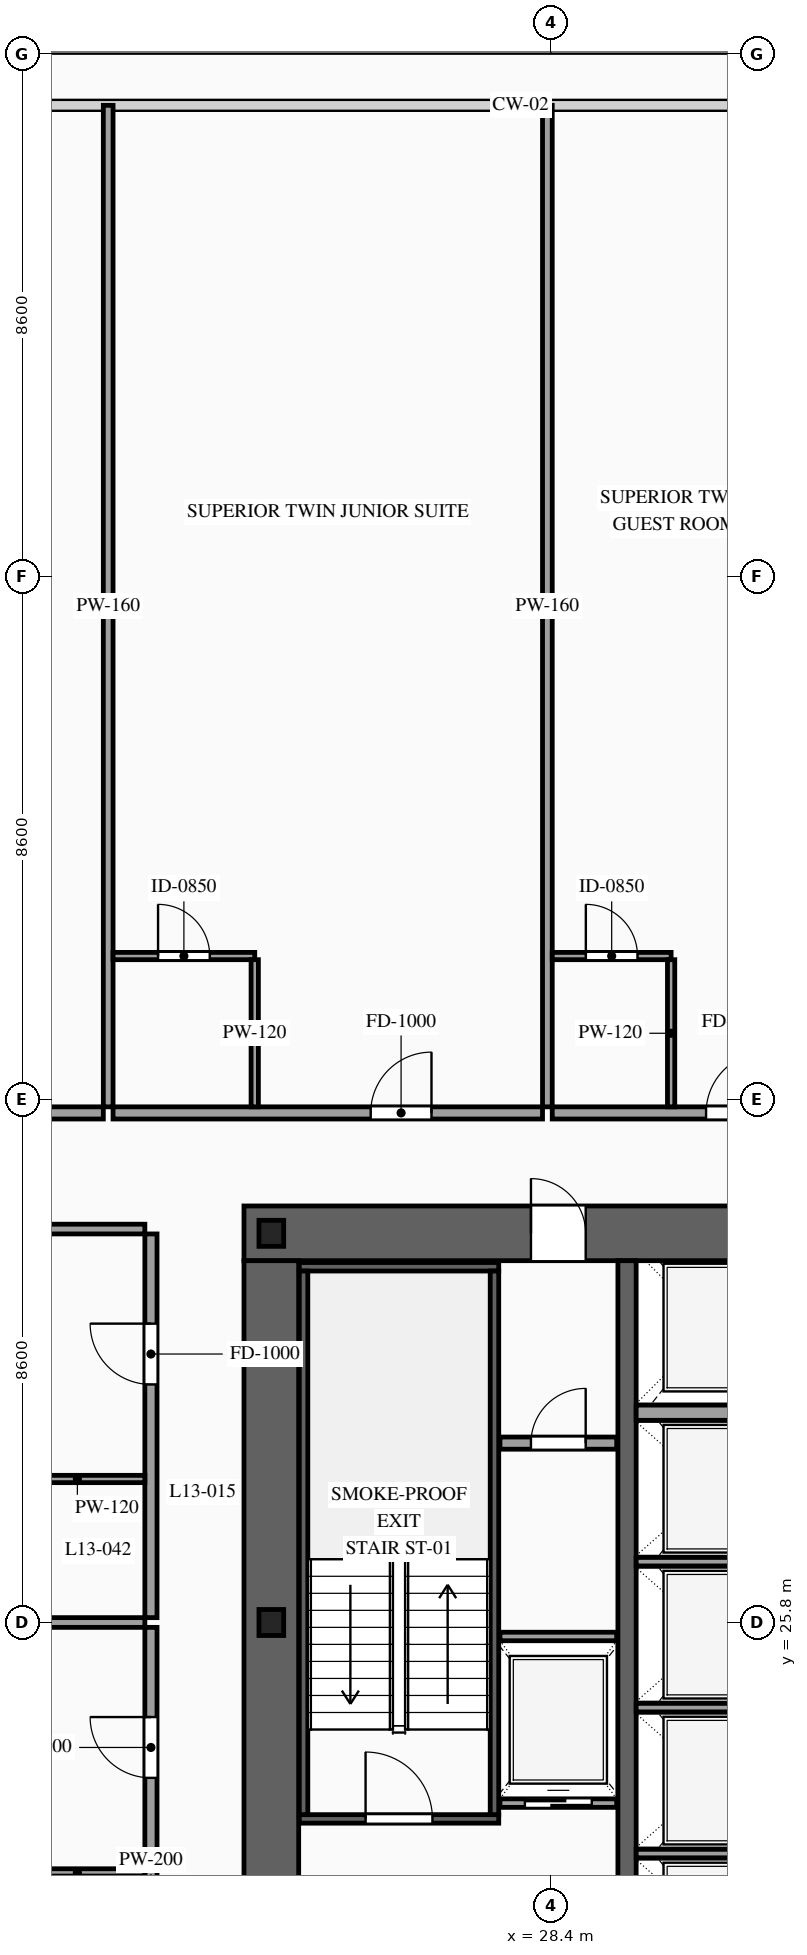
"""IFC4 building model, lengths in metres.
Left out: names, types, materials, properties, quantities, classifications, styles, units other than length and angle.
Written with IfcOpenShell. Run it as: python <this file> out.ifc"""

import sys

from ifc_helpers import new_model, si_unit, direction, frame, frame_2d, origin, origin_2d, place, context, subcontext, project, spatial, rectangle, i_section, extrude, source, transform, mapped, element, fill, save


model = new_model("IFC4")
c1 = context("Model", 3, precision=1e-05, world=origin(), true_north=direction((0.0, 1.0)))
c2 = subcontext(c1, "Body", "Model", "MODEL_VIEW")
j1 = project(units=[si_unit("LENGTHUNIT", "METRE"), si_unit("PLANEANGLEUNIT", "RADIAN")], contexts=[c1])
p1 = place(None, origin())
s1 = spatial("IfcSite", under=j1, at=p1, CompositionType="ELEMENT")
p2 = place(p1, origin())
s2 = spatial("IfcBuilding", under=s1, at=p2, CompositionType="ELEMENT")
p3 = place(p2, frame((0.0, 0.0, 53.2)))
s3 = spatial("IfcBuildingStorey", under=s2, at=p3, CompositionType="ELEMENT", Elevation=53.2)
p4 = place(p3, frame((23.35, 32.2, 0.0), z_axis=(0.0, 0.0, 1.0), x_axis=(1.0, 0.0, 0.0)))
e1 = element("IfcWall", 1, at=p4, inside=s3, PredefinedType="SHEAR", context=c2, shape_type="SweptSolid", body=[
    extrude(rectangle(XDim=27.3, YDim=0.9, at=frame_2d((13.65, 0.0))), origin(), (0.0, 0.0, 1.0), 3.6),
])
p5 = place(p4, frame((4.72, 0.0, 0.0)))
e2 = element("IfcOpeningElement", 2, at=p5, cuts=e1, PredefinedType="OPENING", context=c2, shape_type="SweptSolid", body=[
    extrude(rectangle(XDim=0.9, YDim=2.15, at=frame_2d((0.45, 1.075))), frame((0.0, 0.465, 0.0), z_axis=(0.0, -1.0, 0.0), x_axis=(1.0, 0.0, 0.0)), (0.0, 0.0, 1.0), 0.93),
])
p6 = place(p4, frame((10.0, 0.0, 0.0)))
e3 = element("IfcOpeningElement", 3, at=p6, cuts=e1, PredefinedType="OPENING", context=c2, shape_type="SweptSolid", body=[
    extrude(rectangle(XDim=1.1, YDim=2.2, at=frame_2d((0.55, 1.1))), frame((0.0, 0.465, 0.0), z_axis=(0.0, -1.0, 0.0), x_axis=(1.0, 0.0, 0.0)), (0.0, 0.0, 1.0), 0.93),
])
p7 = place(p4, frame((15.85, 0.0, 0.0)))
e4 = element("IfcOpeningElement", 4, at=p7, cuts=e1, PredefinedType="OPENING", context=c2, shape_type="SweptSolid", body=[
    extrude(rectangle(XDim=1.1, YDim=2.2, at=frame_2d((0.55, 1.1))), frame((0.0, 0.465, 0.0), z_axis=(0.0, -1.0, 0.0), x_axis=(1.0, 0.0, 0.0)), (0.0, 0.0, 1.0), 0.93),
])
p8 = place(p4, frame((19.05, 0.0, 0.0)))
e5 = element("IfcOpeningElement", 5, at=p8, cuts=e1, PredefinedType="OPENING", context=c2, shape_type="SweptSolid", body=[
    extrude(rectangle(XDim=0.9, YDim=2.15, at=frame_2d((0.45, 1.075))), frame((0.0, 0.465, 0.0), z_axis=(0.0, -1.0, 0.0), x_axis=(1.0, 0.0, 0.0)), (0.0, 0.0, 1.0), 0.93),
])
m1 = source(origin(), c2, "Body", "SweptSolid", [
    extrude(rectangle(XDim=11.9, YDim=0.9, at=frame_2d((5.95, 0.0))), origin(), (0.0, 0.0, 1.0), 3.6),
])
p9 = place(p3, frame((23.8, 19.85, 0.0), z_axis=(0.0, 0.0, 1.0), x_axis=(0.0, 1.0, 0.0)))
e6 = element("IfcWall", 6, at=p9, inside=s3, PredefinedType="SHEAR", context=c2, shape_type="MappedRepresentation", body=[
    mapped(m1, transform((0.0, 0.0, 0.0), scale=1.0)),
])
m2 = source(origin(), c2, "Body", "SweptSolid", [
    extrude(rectangle(XDim=11.9, YDim=0.3, at=frame_2d((5.95, 0.0))), origin(), (0.0, 0.0, 1.0), 3.6),
])
p10 = place(p3, frame((29.65, 19.85, 0.0), z_axis=(0.0, 0.0, 1.0), x_axis=(0.0, 1.0, 0.0)))
e7 = element("IfcWall", 7, at=p10, inside=s3, PredefinedType="SOLIDWALL", context=c2, shape_type="MappedRepresentation", body=[
    mapped(m2, transform((0.0, 0.0, 0.0), scale=1.0)),
])
m3 = source(origin(), c2, "Body", "SweptSolid", [
    extrude(i_section(OverallWidth=0.407, OverallDepth=0.428, WebThickness=0.02, FlangeThickness=0.035, at=origin_2d()), origin(), (0.0, 0.0, 1.0), 3.6),
])
for number, where, z_axis, x_axis in (
    (8, (23.8, 25.8, 0.0), (0.0, 0.0, 1.0), (1.0, 0.0, 0.0)),
    (9, (23.8, 32.2, 0.0), (0.0, 0.0, 1.0), (1.0, 0.0, 0.0)),
):
    element("IfcColumn", number, at=place(p3, frame(where, z_axis=z_axis, x_axis=x_axis)), inside=s3, PredefinedType="COLUMN", context=c2, shape_type="MappedRepresentation", body=[
        mapped(m3, transform((0.0, 0.0, 0.0), scale=1.0)),
    ])
p11 = place(p3, frame((27.56, 22.83, 0.0), z_axis=(0.0, 0.0, 1.0), x_axis=(1.0, 0.0, 0.0)))
e10 = element("IfcWall", 10, at=p11, inside=s3, PredefinedType="SOLIDWALL", context=c2, shape_type="SweptSolid", body=[
    extrude(rectangle(XDim=1.92, YDim=0.14, at=frame_2d((0.96, 0.0))), origin(), (0.0, 0.0, 1.0), 3.38),
])
p12 = place(p11, frame((0.41, 0.0, 0.0)))
e11 = element("IfcOpeningElement", 11, at=p12, cuts=e10, PredefinedType="OPENING", context=c2, shape_type="SweptSolid", body=[
    extrude(rectangle(XDim=1.1, YDim=2.2, at=frame_2d((0.55, 1.1))), frame((0.0, 0.085, 0.0), z_axis=(0.0, -1.0, 0.0), x_axis=(1.0, 0.0, 0.0)), (0.0, 0.0, 1.0), 0.17),
])
m4 = source(origin(), c2, "Body", "SweptSolid", [
    extrude(rectangle(XDim=1.92, YDim=0.14, at=frame_2d((0.96, 0.0))), origin(), (0.0, 0.0, 1.0), 3.38),
])
p13 = place(p3, frame((27.56, 25.57, 0.0), z_axis=(0.0, 0.0, 1.0), x_axis=(1.0, 0.0, 0.0)))
e12 = element("IfcWall", 12, at=p13, inside=s3, PredefinedType="SOLIDWALL", context=c2, shape_type="MappedRepresentation", body=[
    mapped(m4, transform((0.0, 0.0, 0.0), scale=1.0)),
])
m5 = source(origin(), c2, "Body", "SweptSolid", [
    extrude(rectangle(XDim=2.5, YDim=0.14, at=frame_2d((1.25, 0.0))), origin(), (0.0, 0.0, 1.0), 3.38),
])
for number, where, z_axis, x_axis in (
    (13, (29.8, 22.0, 0.0), (0.0, 0.0, 1.0), (1.0, 0.0, 0.0)),
    (14, (29.8, 24.4, 0.0), (0.0, 0.0, 1.0), (1.0, 0.0, 0.0)),
    (15, (29.8, 26.8, 0.0), (0.0, 0.0, 1.0), (1.0, 0.0, 0.0)),
):
    element("IfcWall", number, at=place(p3, frame(where, z_axis=z_axis, x_axis=x_axis)), inside=s3, PredefinedType="SOLIDWALL", context=c2, shape_type="MappedRepresentation", body=[
        mapped(m5, transform((0.0, 0.0, 0.0), scale=1.0)),
    ])
m6 = source(origin(), c2, "Body", "SweptSolid", [
    extrude(rectangle(XDim=2.5, YDim=0.25, at=frame_2d((1.25, 0.0))), origin(), (0.0, 0.0, 1.0), 3.38),
])
p14 = place(p3, frame((29.8, 29.25, 0.0), z_axis=(0.0, 0.0, 1.0), x_axis=(1.0, 0.0, 0.0)))
e16 = element("IfcWall", 16, at=p14, inside=s3, PredefinedType="SOLIDWALL", context=c2, shape_type="MappedRepresentation", body=[
    mapped(m6, transform((0.0, 0.0, 0.0), scale=1.0)),
])
p15 = place(p3, frame((24.26, 22.57, 0.0), z_axis=(0.0, 0.0, 1.0), x_axis=(1.0, 0.0, 0.0)))
e17 = element("IfcWall", 17, at=p15, inside=s3, PredefinedType="SOLIDWALL", context=c2, shape_type="SweptSolid", body=[
    extrude(rectangle(XDim=3.28, YDim=0.14, at=frame_2d((1.64, 0.0))), origin(), (0.0, 0.0, 1.0), 3.38),
])
p16 = place(p15, frame((1.09, 0.0, 0.0)))
e18 = element("IfcOpeningElement", 18, at=p16, cuts=e17, PredefinedType="OPENING", context=c2, shape_type="SweptSolid", body=[
    extrude(rectangle(XDim=1.1, YDim=2.2, at=frame_2d((0.55, 1.1))), frame((0.0, 0.085, 0.0), z_axis=(0.0, -1.0, 0.0), x_axis=(1.0, 0.0, 0.0)), (0.0, 0.0, 1.0), 0.17),
])
m7 = source(origin(), c2, "Body", "SweptSolid", [
    extrude(rectangle(XDim=3.28, YDim=0.14, at=frame_2d((1.64, 0.0))), origin(), (0.0, 0.0, 1.0), 3.38),
])
p17 = place(p3, frame((24.26, 31.65, 0.0), z_axis=(0.0, 0.0, 1.0), x_axis=(1.0, 0.0, 0.0)))
e19 = element("IfcWall", 19, at=p17, inside=s3, PredefinedType="SOLIDWALL", context=c2, shape_type="MappedRepresentation", body=[
    mapped(m7, transform((0.0, 0.0, 0.0), scale=1.0)),
])
m8 = source(origin(), c2, "Body", "SweptSolid", [
    extrude(rectangle(XDim=8.94, YDim=0.14, at=frame_2d((4.47, 0.0))), origin(), (0.0, 0.0, 1.0), 3.38),
])
for number, where, z_axis, x_axis in (
    (20, (24.33, 22.64, 0.0), (0.0, 0.0, 1.0), (0.0, 1.0, 0.0)),
    (21, (27.47, 22.64, 0.0), (0.0, 0.0, 1.0), (0.0, 1.0, 0.0)),
):
    element("IfcWall", number, at=place(p3, frame(where, z_axis=z_axis, x_axis=x_axis)), inside=s3, PredefinedType="SOLIDWALL", context=c2, shape_type="MappedRepresentation", body=[
        mapped(m8, transform((0.0, 0.0, 0.0), scale=1.0)),
    ])
p18 = place(p3, frame((27.56, 28.75, 0.0), z_axis=(0.0, 0.0, 1.0), x_axis=(1.0, 0.0, 0.0)))
e22 = element("IfcWall", 22, at=p18, inside=s3, PredefinedType="PARTITIONING", context=c2, shape_type="SweptSolid", body=[
    extrude(rectangle(XDim=1.92, YDim=0.2, at=frame_2d((0.96, 0.0))), origin(), (0.0, 0.0, 1.0), 3.38),
])
p19 = place(p18, frame((0.51, 0.0, 0.0)))
e23 = element("IfcOpeningElement", 23, at=p19, cuts=e22, PredefinedType="OPENING", context=c2, shape_type="SweptSolid", body=[
    extrude(rectangle(XDim=0.9, YDim=2.15, at=frame_2d((0.45, 1.075))), frame((0.0, 0.115, 0.0), z_axis=(0.0, -1.0, 0.0), x_axis=(1.0, 0.0, 0.0)), (0.0, 0.0, 1.0), 0.23),
])
p20 = place(p3, frame((14.94, 34.18, 0.0), z_axis=(0.0, 0.0, 1.0), x_axis=(1.0, 0.0, 0.0)))
e24 = element("IfcWall", 24, at=p20, inside=s3, PredefinedType="PARTITIONING", context=c2, shape_type="SweptSolid", body=[
    extrude(rectangle(XDim=6.097, YDim=0.2, at=frame_2d((3.049, 0.0))), origin(), (0.0, 0.0, 1.0), 3.38),
])
p21 = place(p20, frame((3.754, 0.0, 0.0)))
e25 = element("IfcOpeningElement", 25, at=p21, cuts=e24, PredefinedType="OPENING", context=c2, shape_type="SweptSolid", body=[
    extrude(rectangle(XDim=1.0, YDim=2.2, at=frame_2d((0.5, 1.1))), frame((0.0, 0.115, 0.0), z_axis=(0.0, -1.0, 0.0), x_axis=(1.0, 0.0, 0.0)), (0.0, 0.0, 1.0), 0.23),
])
m9 = source(origin(), c2, "Body", "SweptSolid", [
    extrude(rectangle(XDim=16.47, YDim=0.16, at=frame_2d((8.235, 0.0))), origin(), (0.0, 0.0, 1.0), 3.38),
])
p22 = place(p3, frame((21.117, 34.28, 0.0), z_axis=(0.0, 0.0, 1.0), x_axis=(0.0, 1.0, 0.0)))
e26 = element("IfcWall", 26, at=p22, inside=s3, PredefinedType="PARTITIONING", context=c2, shape_type="MappedRepresentation", body=[
    mapped(m9, transform((0.0, 0.0, 0.0), scale=1.0)),
])
p23 = place(p3, frame((21.197, 34.18, 0.0), z_axis=(0.0, 0.0, 1.0), x_axis=(1.0, 0.0, 0.0)))
e27 = element("IfcWall", 27, at=p23, inside=s3, PredefinedType="PARTITIONING", context=c2, shape_type="SweptSolid", body=[
    extrude(rectangle(XDim=7.063, YDim=0.2, at=frame_2d((3.531, 0.0))), origin(), (0.0, 0.0, 1.0), 3.38),
])
p24 = place(p23, frame((4.237, 0.0, 0.0)))
e28 = element("IfcOpeningElement", 28, at=p24, cuts=e27, PredefinedType="OPENING", context=c2, shape_type="SweptSolid", body=[
    extrude(rectangle(XDim=1.0, YDim=2.2, at=frame_2d((0.5, 1.1))), frame((0.0, 0.115, 0.0), z_axis=(0.0, -1.0, 0.0), x_axis=(1.0, 0.0, 0.0)), (0.0, 0.0, 1.0), 0.23),
])
p25 = place(p3, frame((28.34, 34.28, 0.0), z_axis=(0.0, 0.0, 1.0), x_axis=(0.0, 1.0, 0.0)))
e29 = element("IfcWall", 29, at=p25, inside=s3, PredefinedType="PARTITIONING", context=c2, shape_type="MappedRepresentation", body=[
    mapped(m9, transform((0.0, 0.0, 0.0), scale=1.0)),
])
p26 = place(p3, frame((21.197, 36.76, 0.0), z_axis=(0.0, 0.0, 1.0), x_axis=(1.0, 0.0, 0.0)))
e30 = element("IfcWall", 30, at=p26, inside=s3, PredefinedType="PARTITIONING", context=c2, shape_type="SweptSolid", body=[
    extrude(rectangle(XDim=2.33, YDim=0.12, at=frame_2d((1.165, 0.0))), origin(), (0.0, 0.0, 1.0), 3.38),
])
p27 = place(p26, frame((0.74, 0.0, 0.0)))
e31 = element("IfcOpeningElement", 31, at=p27, cuts=e30, PredefinedType="OPENING", context=c2, shape_type="SweptSolid", body=[
    extrude(rectangle(XDim=0.85, YDim=2.1, at=frame_2d((0.425, 1.05))), frame((0.0, 0.075, 0.0), z_axis=(0.0, -1.0, 0.0), x_axis=(1.0, 0.0, 0.0)), (0.0, 0.0, 1.0), 0.15),
])
m10 = source(origin(), c2, "Body", "SweptSolid", [
    extrude(rectangle(XDim=2.42, YDim=0.12, at=frame_2d((1.21, 0.0))), origin(), (0.0, 0.0, 1.0), 3.38),
])
p28 = place(p3, frame((23.527, 34.28, 0.0), z_axis=(0.0, 0.0, 1.0), x_axis=(0.0, 1.0, 0.0)))
e32 = element("IfcWall", 32, at=p28, inside=s3, PredefinedType="PARTITIONING", context=c2, shape_type="MappedRepresentation", body=[
    mapped(m10, transform((0.0, 0.0, 0.0), scale=1.0)),
])
p29 = place(p3, frame((28.42, 34.18, 0.0), z_axis=(0.0, 0.0, 1.0), x_axis=(1.0, 0.0, 0.0)))
e33 = element("IfcWall", 33, at=p29, inside=s3, PredefinedType="PARTITIONING", context=c2, shape_type="SweptSolid", body=[
    extrude(rectangle(XDim=4.025, YDim=0.2, at=frame_2d((2.013, 0.0))), origin(), (0.0, 0.0, 1.0), 3.38),
])
p30 = place(p29, frame((2.53, 0.0, 0.0)))
e34 = element("IfcOpeningElement", 34, at=p30, cuts=e33, PredefinedType="OPENING", context=c2, shape_type="SweptSolid", body=[
    extrude(rectangle(XDim=1.0, YDim=2.2, at=frame_2d((0.5, 1.1))), frame((0.0, 0.115, 0.0), z_axis=(0.0, -1.0, 0.0), x_axis=(1.0, 0.0, 0.0)), (0.0, 0.0, 1.0), 0.23),
])
p31 = place(p3, frame((28.42, 36.76, 0.0), z_axis=(0.0, 0.0, 1.0), x_axis=(1.0, 0.0, 0.0)))
e35 = element("IfcWall", 35, at=p31, inside=s3, PredefinedType="PARTITIONING", context=c2, shape_type="SweptSolid", body=[
    extrude(rectangle(XDim=1.955, YDim=0.12, at=frame_2d((0.978, 0.0))), origin(), (0.0, 0.0, 1.0), 3.38),
])
p32 = place(p31, frame((0.552, 0.0, 0.0)))
e36 = element("IfcOpeningElement", 36, at=p32, cuts=e35, PredefinedType="OPENING", context=c2, shape_type="SweptSolid", body=[
    extrude(rectangle(XDim=0.85, YDim=2.1, at=frame_2d((0.425, 1.05))), frame((0.0, 0.075, 0.0), z_axis=(0.0, -1.0, 0.0), x_axis=(1.0, 0.0, 0.0)), (0.0, 0.0, 1.0), 0.15),
])
p33 = place(p3, frame((30.375, 34.28, 0.0), z_axis=(0.0, 0.0, 1.0), x_axis=(0.0, 1.0, 0.0)))
e37 = element("IfcWall", 37, at=p33, inside=s3, PredefinedType="PARTITIONING", context=c2, shape_type="MappedRepresentation", body=[
    mapped(m10, transform((0.0, 0.0, 0.0), scale=1.0)),
])
p34 = place(p3, frame((21.82, 19.41, 0.0), z_axis=(0.0, 0.0, 1.0), x_axis=(0.0, 1.0, 0.0)))
e38 = element("IfcWall", 38, at=p34, inside=s3, PredefinedType="PARTITIONING", context=c2, shape_type="SweptSolid", body=[
    extrude(rectangle(XDim=6.31, YDim=0.2, at=frame_2d((3.155, 0.0))), origin(), (0.0, 0.0, 1.0), 3.38),
])
p35 = place(p34, frame((3.835, 0.0, 0.0)))
e39 = element("IfcOpeningElement", 39, at=p35, cuts=e38, PredefinedType="OPENING", context=c2, shape_type="SweptSolid", body=[
    extrude(rectangle(XDim=1.0, YDim=2.2, at=frame_2d((0.5, 1.1))), frame((0.0, 0.115, 0.0), z_axis=(0.0, -1.0, 0.0), x_axis=(1.0, 0.0, 0.0)), (0.0, 0.0, 1.0), 0.23),
])
m11 = source(origin(), c2, "Body", "SweptSolid", [
    extrude(rectangle(XDim=9.67, YDim=0.16, at=frame_2d((4.835, 0.0))), origin(), (0.0, 0.0, 1.0), 2.575),
])
p36 = place(p3, frame((12.05, 25.8, 0.0), z_axis=(0.0, 0.0, 1.0), x_axis=(1.0, 0.0, 0.0)))
e40 = element("IfcWall", 40, at=p36, inside=s3, PredefinedType="PARTITIONING", context=c2, shape_type="MappedRepresentation", body=[
    mapped(m11, transform((0.0, 0.0, 0.0), scale=1.0)),
])
m12 = source(origin(), c2, "Body", "SweptSolid", [
    extrude(rectangle(XDim=2.22, YDim=0.12, at=frame_2d((1.11, 0.0))), origin(), (0.0, 0.0, 1.0), 3.38),
])
p37 = place(p3, frame((19.5, 21.69, 0.0), z_axis=(0.0, 0.0, 1.0), x_axis=(1.0, 0.0, 0.0)))
e41 = element("IfcWall", 41, at=p37, inside=s3, PredefinedType="PARTITIONING", context=c2, shape_type="MappedRepresentation", body=[
    mapped(m12, transform((0.0, 0.0, 0.0), scale=1.0)),
])
p38 = place(p3, frame((21.82, 25.88, 0.0), z_axis=(0.0, 0.0, 1.0), x_axis=(0.0, 1.0, 0.0)))
e42 = element("IfcWall", 42, at=p38, inside=s3, PredefinedType="PARTITIONING", context=c2, shape_type="SweptSolid", body=[
    extrude(rectangle(XDim=6.31, YDim=0.2, at=frame_2d((3.155, 0.0))), origin(), (0.0, 0.0, 1.0), 3.38),
])
p39 = place(p38, frame((3.835, 0.0, 0.0)))
e43 = element("IfcOpeningElement", 43, at=p39, cuts=e42, PredefinedType="OPENING", context=c2, shape_type="SweptSolid", body=[
    extrude(rectangle(XDim=1.0, YDim=2.2, at=frame_2d((0.5, 1.1))), frame((0.0, 0.115, 0.0), z_axis=(0.0, -1.0, 0.0), x_axis=(1.0, 0.0, 0.0)), (0.0, 0.0, 1.0), 0.23),
])
m13 = source(origin(), c2, "Body", "SweptSolid", [
    extrude(rectangle(XDim=9.67, YDim=0.16, at=frame_2d((4.835, 0.0))), origin(), (0.0, 0.0, 1.0), 2.875),
])
p40 = place(p3, frame((12.05, 32.27, 0.0), z_axis=(0.0, 0.0, 1.0), x_axis=(1.0, 0.0, 0.0)))
e44 = element("IfcWall", 44, at=p40, inside=s3, PredefinedType="PARTITIONING", context=c2, shape_type="MappedRepresentation", body=[
    mapped(m13, transform((0.0, 0.0, 0.0), scale=1.0)),
])
p41 = place(p3, frame((19.5, 28.16, 0.0), z_axis=(0.0, 0.0, 1.0), x_axis=(1.0, 0.0, 0.0)))
e45 = element("IfcWall", 45, at=p41, inside=s3, PredefinedType="PARTITIONING", context=c2, shape_type="MappedRepresentation", body=[
    mapped(m12, transform((0.0, 0.0, 0.0), scale=1.0)),
])
m14 = source(origin(), c2, "Body", "SweptSolid", [
    extrude(rectangle(XDim=1.1, YDim=2.2, at=frame_2d((0.55, 1.1))), frame((0.0, 0.025, 0.0), z_axis=(0.0, -1.0, 0.0), x_axis=(1.0, 0.0, 0.0)), (0.0, 0.0, 1.0), 0.05),
])
p42 = place(p12, origin())
e46 = element("IfcDoor", 46, at=p42, inside=s3, OperationType="SLIDING_TO_LEFT", PredefinedType="DOOR", context=c2, shape_type="MappedRepresentation", body=[
    mapped(m14, transform((0.0, 0.0, 0.0), scale=1.0)),
])
fill(e11, e46)
m15 = source(origin(), c2, "Body", "SweptSolid", [
    extrude(rectangle(XDim=1.1, YDim=2.2, at=frame_2d((0.55, 1.1))), frame((0.0, 0.025, 0.0), z_axis=(0.0, -1.0, 0.0), x_axis=(1.0, 0.0, 0.0)), (0.0, 0.0, 1.0), 0.05),
])
p43 = place(p16, origin())
e47 = element("IfcDoor", 47, at=p43, inside=s3, OperationType="SINGLE_SWING_LEFT", PredefinedType="DOOR", context=c2, shape_type="MappedRepresentation", body=[
    mapped(m15, transform((0.0, 0.0, 0.0), scale=1.0)),
])
fill(e18, e47)
m16 = source(origin(), c2, "Body", "SweptSolid", [
    extrude(rectangle(XDim=0.9, YDim=2.15, at=frame_2d((0.45, 1.075))), frame((0.0, 0.025, 0.0), z_axis=(0.0, -1.0, 0.0), x_axis=(1.0, 0.0, 0.0)), (0.0, 0.0, 1.0), 0.05),
])
p44 = place(p5, origin())
e48 = element("IfcDoor", 48, at=p44, inside=s3, OperationType="SINGLE_SWING_LEFT", PredefinedType="DOOR", context=c2, shape_type="MappedRepresentation", body=[
    mapped(m16, transform((0.0, 0.0, 0.0), scale=1.0)),
])
fill(e2, e48)
p45 = place(p19, origin())
e49 = element("IfcDoor", 49, at=p45, inside=s3, OperationType="SINGLE_SWING_RIGHT", PredefinedType="DOOR", context=c2, shape_type="MappedRepresentation", body=[
    mapped(m16, transform((0.0, 0.0, 0.0), scale=1.0)),
])
fill(e23, e49)
m17 = source(origin(), c2, "Body", "SweptSolid", [
    extrude(rectangle(XDim=1.0, YDim=2.2, at=frame_2d((0.5, 1.1))), frame((0.0, 0.025, 0.0), z_axis=(0.0, -1.0, 0.0), x_axis=(1.0, 0.0, 0.0)), (0.0, 0.0, 1.0), 0.05),
])
p46 = place(p24, origin())
e50 = element("IfcDoor", 50, at=p46, inside=s3, OperationType="SINGLE_SWING_RIGHT", PredefinedType="DOOR", context=c2, shape_type="MappedRepresentation", body=[
    mapped(m17, transform((0.0, 0.0, 0.0), scale=1.0)),
])
fill(e28, e50)
m18 = source(origin(), c2, "Body", "SweptSolid", [
    extrude(rectangle(XDim=0.85, YDim=2.1, at=frame_2d((0.425, 1.05))), frame((0.0, 0.025, 0.0), z_axis=(0.0, -1.0, 0.0), x_axis=(1.0, 0.0, 0.0)), (0.0, 0.0, 1.0), 0.05),
])
p47 = place(p27, origin())
e51 = element("IfcDoor", 51, at=p47, inside=s3, OperationType="SINGLE_SWING_LEFT", PredefinedType="DOOR", context=c2, shape_type="MappedRepresentation", body=[
    mapped(m18, transform((0.0, 0.0, 0.0), scale=1.0)),
])
fill(e31, e51)
p48 = place(p30, origin())
e52 = element("IfcDoor", 52, at=p48, inside=s3, OperationType="SINGLE_SWING_RIGHT", PredefinedType="DOOR", context=c2, shape_type="MappedRepresentation", body=[
    mapped(m17, transform((0.0, 0.0, 0.0), scale=1.0)),
])
fill(e34, e52)
p49 = place(p32, origin())
e53 = element("IfcDoor", 53, at=p49, inside=s3, OperationType="SINGLE_SWING_LEFT", PredefinedType="DOOR", context=c2, shape_type="MappedRepresentation", body=[
    mapped(m18, transform((0.0, 0.0, 0.0), scale=1.0)),
])
fill(e36, e53)
p50 = place(p35, origin())
e54 = element("IfcDoor", 54, at=p50, inside=s3, OperationType="SINGLE_SWING_RIGHT", PredefinedType="DOOR", context=c2, shape_type="MappedRepresentation", body=[
    mapped(m17, transform((0.0, 0.0, 0.0), scale=1.0)),
])
fill(e39, e54)
p51 = place(p39, origin())
e55 = element("IfcDoor", 55, at=p51, inside=s3, OperationType="SINGLE_SWING_RIGHT", PredefinedType="DOOR", context=c2, shape_type="MappedRepresentation", body=[
    mapped(m17, transform((0.0, 0.0, 0.0), scale=1.0)),
])
fill(e43, e55)
save(model, sys.argv[1])
